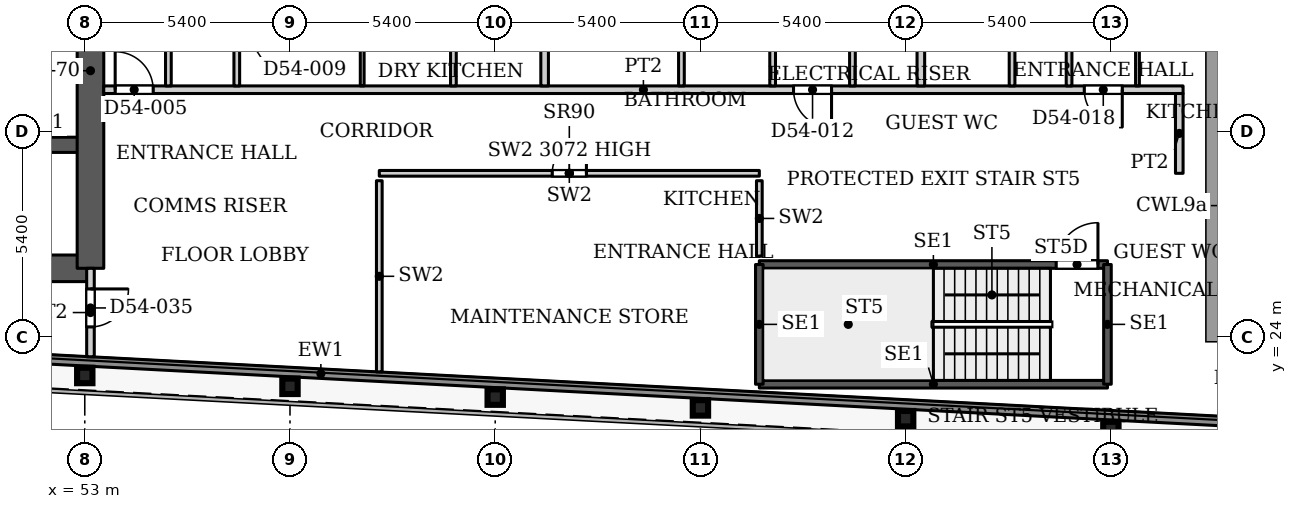
"""IFC4 building model, lengths in metres.
Left out: names, types, materials, properties, quantities, classifications, styles, units other than length and angle.
Written with IfcOpenShell. Run it as: python <this file> out.ifc"""

import sys

from ifc_helpers import new_model, si_unit, direction, frame, frame_2d, origin, origin_2d, place, context, subcontext, project, spatial, rectangle, i_section, extrude, source, transform, mapped, element, fill, save


model = new_model("IFC4")
c1 = context("Model", 3, precision=1e-05, world=origin(), true_north=direction((0.0, 1.0)))
c2 = subcontext(c1, "Body", "Model", "MODEL_VIEW")
j1 = project(units=[si_unit("LENGTHUNIT", "METRE"), si_unit("PLANEANGLEUNIT", "RADIAN")], contexts=[c1])
p1 = place(None, origin())
s1 = spatial("IfcSite", under=j1, at=p1, CompositionType="ELEMENT")
p2 = place(p1, origin())
s2 = spatial("IfcBuilding", under=s1, at=p2, CompositionType="ELEMENT")
p3 = place(p2, frame((0.0, 0.0, 231.8)))
s3 = spatial("IfcBuildingStorey", under=s2, at=p3, CompositionType="ELEMENT", Elevation=231.8)
for number, where, z_axis, x_axis in (
    (1, (80.0, 21.558, 0.0), (0.0, 0.0, 1.0), (1.0, 0.0, 0.0)),
    (2, (74.6, 21.843, 0.0), (0.0, 0.0, 1.0), (1.0, 0.0, 0.0)),
    (3, (69.2, 22.127, 0.0), (0.0, 0.0, 1.0), (1.0, 0.0, 0.0)),
    (4, (63.8, 22.411, 0.0), (0.0, 0.0, 1.0), (1.0, 0.0, 0.0)),
    (5, (58.4, 22.695, 0.0), (0.0, 0.0, 1.0), (1.0, 0.0, 0.0)),
    (6, (53.0, 22.98, 0.0), (0.0, 0.0, 1.0), (1.0, 0.0, 0.0)),
):
    element("IfcColumn", number, at=place(p3, frame(where, z_axis=z_axis, x_axis=x_axis)), inside=s3, PredefinedType="COLUMN", context=c2, shape_type="SweptSolid", body=[
        extrude(i_section(OverallWidth=0.404, OverallDepth=0.407, WebThickness=0.027, FlangeThickness=0.044, FilletRadius=0.012, at=origin_2d()), origin(), (0.0, 0.0, 1.0), 3.9),
    ])
p4 = place(p3, frame((34.75, 25.8, 0.0), z_axis=(0.0, 0.0, 1.0), x_axis=(1.0, 0.0, 0.0)))
e7 = element("IfcWall", 7, at=p4, inside=s3, PredefinedType="SHEAR", context=c2, shape_type="SweptSolid", body=[
    extrude(rectangle(XDim=18.4, YDim=0.7, at=frame_2d((9.2, 0.0))), origin(), (0.0, 0.0, 1.0), 3.9),
])
p5 = place(p3, frame((34.75, 29.05, 0.0), z_axis=(0.0, 0.0, 1.0), x_axis=(1.0, 0.0, 0.0)))
e8 = element("IfcWall", 8, at=p5, inside=s3, PredefinedType="SHEAR", context=c2, shape_type="SweptSolid", body=[
    extrude(rectangle(XDim=18.4, YDim=0.4, at=frame_2d((9.2, 0.0))), origin(), (0.0, 0.0, 1.0), 3.9),
])
p6 = place(p5, frame((0.875, 0.0, 0.0)))
e9 = element("IfcOpeningElement", 9, at=p6, cuts=e8, PredefinedType="OPENING", context=c2, shape_type="SweptSolid", body=[
    extrude(rectangle(XDim=1.1, YDim=2.2, at=frame_2d((0.55, 1.1))), frame((0.0, 0.21, 0.0), z_axis=(0.0, -1.0, 0.0), x_axis=(1.0, 0.0, 0.0)), (0.0, 0.0, 1.0), 0.42),
])
p7 = place(p5, frame((3.725, 0.0, 0.0)))
e10 = element("IfcOpeningElement", 10, at=p7, cuts=e8, PredefinedType="OPENING", context=c2, shape_type="SweptSolid", body=[
    extrude(rectangle(XDim=1.1, YDim=2.2, at=frame_2d((0.55, 1.1))), frame((0.0, 0.21, 0.0), z_axis=(0.0, -1.0, 0.0), x_axis=(1.0, 0.0, 0.0)), (0.0, 0.0, 1.0), 0.42),
])
p8 = place(p5, frame((6.575, 0.0, 0.0)))
e11 = element("IfcOpeningElement", 11, at=p8, cuts=e8, PredefinedType="OPENING", context=c2, shape_type="SweptSolid", body=[
    extrude(rectangle(XDim=1.1, YDim=2.2, at=frame_2d((0.55, 1.1))), frame((0.0, 0.21, 0.0), z_axis=(0.0, -1.0, 0.0), x_axis=(1.0, 0.0, 0.0)), (0.0, 0.0, 1.0), 0.42),
])
p9 = place(p5, frame((9.425, 0.0, 0.0)))
e12 = element("IfcOpeningElement", 12, at=p9, cuts=e8, PredefinedType="OPENING", context=c2, shape_type="SweptSolid", body=[
    extrude(rectangle(XDim=1.1, YDim=2.2, at=frame_2d((0.55, 1.1))), frame((0.0, 0.21, 0.0), z_axis=(0.0, -1.0, 0.0), x_axis=(1.0, 0.0, 0.0)), (0.0, 0.0, 1.0), 0.42),
])
p10 = place(p5, frame((12.275, 0.0, 0.0)))
e13 = element("IfcOpeningElement", 13, at=p10, cuts=e8, PredefinedType="OPENING", context=c2, shape_type="SweptSolid", body=[
    extrude(rectangle(XDim=1.1, YDim=2.2, at=frame_2d((0.55, 1.1))), frame((0.0, 0.21, 0.0), z_axis=(0.0, -1.0, 0.0), x_axis=(1.0, 0.0, 0.0)), (0.0, 0.0, 1.0), 0.42),
])
p11 = place(p5, frame((15.125, 0.0, 0.0)))
e14 = element("IfcOpeningElement", 14, at=p11, cuts=e8, PredefinedType="OPENING", context=c2, shape_type="SweptSolid", body=[
    extrude(rectangle(XDim=1.1, YDim=2.2, at=frame_2d((0.55, 1.1))), frame((0.0, 0.21, 0.0), z_axis=(0.0, -1.0, 0.0), x_axis=(1.0, 0.0, 0.0)), (0.0, 0.0, 1.0), 0.42),
])
p12 = place(p3, frame((53.15, 25.8, 0.0), z_axis=(0.0, 0.0, 1.0), x_axis=(0.0, 1.0, 0.0)))
e15 = element("IfcWall", 15, at=p12, inside=s3, PredefinedType="SHEAR", context=c2, shape_type="SweptSolid", body=[
    extrude(rectangle(XDim=10.4, YDim=0.7, at=frame_2d((5.2, 0.0))), origin(), (0.0, 0.0, 1.0), 3.9),
])
p13 = place(p3, frame((84.386, 21.703, 0.0), z_axis=(0.0, 0.0, 1.0), x_axis=(-0.998617508267, 0.05256493302, 0.0)))
e16 = element("IfcWall", 16, at=p13, inside=s3, PredefinedType="SOLIDWALL", context=c2, shape_type="SweptSolid", body=[
    extrude(rectangle(XDim=50.417, YDim=0.25, at=frame_2d((25.208, 0.0))), origin(), (0.0, 0.0, 1.0), 3.75),
])
p14 = place(p3, frame((70.75, 22.75, 0.0), z_axis=(0.0, 0.0, 1.0), x_axis=(1.0, 0.0, 0.0)))
e17 = element("IfcWall", 17, at=p14, inside=s3, PredefinedType="SHEAR", context=c2, shape_type="SweptSolid", body=[
    extrude(rectangle(XDim=9.16, YDim=0.2, at=frame_2d((4.58, 0.0))), origin(), (0.0, 0.0, 1.0), 3.9),
])
p15 = place(p3, frame((70.75, 25.9, 0.0), z_axis=(0.0, 0.0, 1.0), x_axis=(1.0, 0.0, 0.0)))
e18 = element("IfcWall", 18, at=p15, inside=s3, PredefinedType="SHEAR", context=c2, shape_type="SweptSolid", body=[
    extrude(rectangle(XDim=9.16, YDim=0.2, at=frame_2d((4.58, 0.0))), origin(), (0.0, 0.0, 1.0), 3.9),
])
p16 = place(p15, frame((7.81, 0.0, 0.0)))
e19 = element("IfcOpeningElement", 19, at=p16, cuts=e18, PredefinedType="OPENING", context=c2, shape_type="SweptSolid", body=[
    extrude(rectangle(XDim=1.1, YDim=2.2, at=frame_2d((0.55, 1.1))), frame((0.0, 0.11, 0.0), z_axis=(0.0, -1.0, 0.0), x_axis=(1.0, 0.0, 0.0)), (0.0, 0.0, 1.0), 0.22),
])
for number, where, z_axis, x_axis in (
    (20, (70.75, 22.75, 0.0), (0.0, 0.0, 1.0), (0.0, 1.0, 0.0)),
    (21, (79.91, 22.75, 0.0), (0.0, 0.0, 1.0), (0.0, 1.0, 0.0)),
):
    element("IfcWall", number, at=place(p3, frame(where, z_axis=z_axis, x_axis=x_axis)), inside=s3, PredefinedType="SHEAR", context=c2, shape_type="SweptSolid", body=[
        extrude(rectangle(XDim=3.15, YDim=0.2, at=frame_2d((1.575, 0.0))), origin(), (0.0, 0.0, 1.0), 3.9),
    ])
p17 = place(p3, frame((60.75, 28.3, 0.0), z_axis=(0.0, 0.0, 1.0), x_axis=(1.0, 0.0, 0.0)))
e22 = element("IfcWall", 22, at=p17, inside=s3, PredefinedType="PARTITIONING", context=c2, shape_type="SweptSolid", body=[
    extrude(rectangle(XDim=10.0, YDim=0.15, at=frame_2d((5.0, 0.0))), origin(), (0.0, 0.0, 1.0), 3.072),
])
p18 = place(p17, frame((4.55, 0.0, 0.0)))
e23 = element("IfcOpeningElement", 23, at=p18, cuts=e22, PredefinedType="OPENING", context=c2, shape_type="SweptSolid", body=[
    extrude(rectangle(XDim=0.9, YDim=2.2, at=frame_2d((0.45, 1.1))), frame((0.0, 0.085, 0.0), z_axis=(0.0, -1.0, 0.0), x_axis=(1.0, 0.0, 0.0)), (0.0, 0.0, 1.0), 0.17),
])
p19 = place(p3, frame((60.75, 23.075, 0.0), z_axis=(0.0, 0.0, 1.0), x_axis=(0.0, 1.0, 0.0)))
e24 = element("IfcWall", 24, at=p19, inside=s3, PredefinedType="PARTITIONING", context=c2, shape_type="SweptSolid", body=[
    extrude(rectangle(XDim=5.03, YDim=0.15, at=frame_2d((2.515, 0.0))), origin(), (0.0, 0.0, 1.0), 3.9),
])
p20 = place(p3, frame((70.75, 26.12, 0.0), z_axis=(0.0, 0.0, 1.0), x_axis=(0.0, 1.0, 0.0)))
e25 = element("IfcWall", 25, at=p20, inside=s3, PredefinedType="PARTITIONING", context=c2, shape_type="SweptSolid", body=[
    extrude(rectangle(XDim=1.985, YDim=0.15, at=frame_2d((0.992, 0.0))), origin(), (0.0, 0.0, 1.0), 3.9),
])
p21 = place(p3, frame((53.15, 23.472, 0.0), z_axis=(0.0, 0.0, 1.0), x_axis=(0.0, 1.0, 0.0)))
e26 = element("IfcWall", 26, at=p21, inside=s3, PredefinedType="PARTITIONING", context=c2, shape_type="SweptSolid", body=[
    extrude(rectangle(XDim=2.328, YDim=0.2, at=frame_2d((1.164, 0.0))), origin(), (0.0, 0.0, 1.0), 3.6),
])
p22 = place(p21, frame((0.785, 0.0, 0.0)))
e27 = element("IfcOpeningElement", 27, at=p22, cuts=e26, PredefinedType="OPENING", context=c2, shape_type="SweptSolid", body=[
    extrude(rectangle(XDim=1.0, YDim=2.1, at=frame_2d((0.5, 1.05))), frame((0.0, 0.11, 0.0), z_axis=(0.0, -1.0, 0.0), x_axis=(1.0, 0.0, 0.0)), (0.0, 0.0, 1.0), 0.22),
])
p23 = place(p3, frame((53.499, 30.5, 0.0), z_axis=(0.0, 0.0, 1.0), x_axis=(1.0, 0.0, 0.0)))
e28 = element("IfcWall", 28, at=p23, inside=s3, PredefinedType="PARTITIONING", context=c2, shape_type="SweptSolid", body=[
    extrude(rectangle(XDim=28.401, YDim=0.2, at=frame_2d((14.2, 0.0))), origin(), (0.0, 0.0, 1.0), 3.6),
])
p24 = place(p23, frame((0.301, 0.0, 0.0)))
e29 = element("IfcOpeningElement", 29, at=p24, cuts=e28, PredefinedType="OPENING", context=c2, shape_type="SweptSolid", body=[
    extrude(rectangle(XDim=1.0, YDim=2.1, at=frame_2d((0.5, 1.05))), frame((0.0, 0.11, 0.0), z_axis=(0.0, -1.0, 0.0), x_axis=(1.0, 0.0, 0.0)), (0.0, 0.0, 1.0), 0.22),
])
p25 = place(p23, frame((18.151, 0.0, 0.0)))
e30 = element("IfcOpeningElement", 30, at=p25, cuts=e28, PredefinedType="OPENING", context=c2, shape_type="SweptSolid", body=[
    extrude(rectangle(XDim=1.0, YDim=2.1, at=frame_2d((0.5, 1.05))), frame((0.0, 0.11, 0.0), z_axis=(0.0, -1.0, 0.0), x_axis=(1.0, 0.0, 0.0)), (0.0, 0.0, 1.0), 0.22),
])
p26 = place(p23, frame((25.801, 0.0, 0.0)))
e31 = element("IfcOpeningElement", 31, at=p26, cuts=e28, PredefinedType="OPENING", context=c2, shape_type="SweptSolid", body=[
    extrude(rectangle(XDim=1.0, YDim=2.1, at=frame_2d((0.5, 1.05))), frame((0.0, 0.11, 0.0), z_axis=(0.0, -1.0, 0.0), x_axis=(1.0, 0.0, 0.0)), (0.0, 0.0, 1.0), 0.22),
])
for number, where, z_axis, x_axis in (
    (32, (55.2, 30.6, 0.0), (0.0, 0.0, 1.0), (0.0, 1.0, 0.0)),
    (33, (57.0, 30.6, 0.0), (0.0, 0.0, 1.0), (0.0, 1.0, 0.0)),
):
    element("IfcWall", number, at=place(p3, frame(where, z_axis=z_axis, x_axis=x_axis)), inside=s3, PredefinedType="PARTITIONING", context=c2, shape_type="SweptSolid", body=[
        extrude(rectangle(XDim=3.025, YDim=0.15, at=frame_2d((1.512, 0.0))), origin(), (0.0, 0.0, 1.0), 3.6),
    ])
p27 = place(p3, frame((60.3, 30.6, 0.0), z_axis=(0.0, 0.0, 1.0), x_axis=(0.0, 1.0, 0.0)))
e34 = element("IfcWall", 34, at=p27, inside=s3, PredefinedType="PARTITIONING", context=c2, shape_type="SweptSolid", body=[
    extrude(rectangle(XDim=3.025, YDim=0.1, at=frame_2d((1.512, 0.0))), origin(), (0.0, 0.0, 1.0), 3.6),
])
p28 = place(p3, frame((62.7, 30.6, 0.0), z_axis=(0.0, 0.0, 1.0), x_axis=(0.0, 1.0, 0.0)))
e35 = element("IfcWall", 35, at=p28, inside=s3, PredefinedType="PARTITIONING", context=c2, shape_type="SweptSolid", body=[
    extrude(rectangle(XDim=3.025, YDim=0.15, at=frame_2d((1.512, 0.0))), origin(), (0.0, 0.0, 1.0), 3.6),
])
p29 = place(p3, frame((65.1, 30.6, 0.0), z_axis=(0.0, 0.0, 1.0), x_axis=(0.0, 1.0, 0.0)))
e36 = element("IfcWall", 36, at=p29, inside=s3, PredefinedType="PARTITIONING", context=c2, shape_type="SweptSolid", body=[
    extrude(rectangle(XDim=13.3, YDim=0.2, at=frame_2d((6.65, 0.0))), origin(), (0.0, 0.0, 1.0), 3.6),
])
for number, where, z_axis, x_axis in (
    (37, (68.7, 30.6, 0.0), (0.0, 0.0, 1.0), (0.0, 1.0, 0.0)),
    (38, (71.1, 30.6, 0.0), (0.0, 0.0, 1.0), (0.0, 1.0, 0.0)),
):
    element("IfcWall", number, at=place(p3, frame(where, z_axis=z_axis, x_axis=x_axis)), inside=s3, PredefinedType="PARTITIONING", context=c2, shape_type="SweptSolid", body=[
        extrude(rectangle(XDim=3.025, YDim=0.15, at=frame_2d((1.512, 0.0))), origin(), (0.0, 0.0, 1.0), 3.6),
    ])
p30 = place(p3, frame((73.2, 30.6, 0.0), z_axis=(0.0, 0.0, 1.0), x_axis=(0.0, 1.0, 0.0)))
e39 = element("IfcWall", 39, at=p30, inside=s3, PredefinedType="PARTITIONING", context=c2, shape_type="SweptSolid", body=[
    extrude(rectangle(XDim=3.175, YDim=0.15, at=frame_2d((1.587, 0.0))), origin(), (0.0, 0.0, 1.0), 3.6),
])
p31 = place(p3, frame((75.0, 30.6, 0.0), z_axis=(0.0, 0.0, 1.0), x_axis=(0.0, 1.0, 0.0)))
e40 = element("IfcWall", 40, at=p31, inside=s3, PredefinedType="PARTITIONING", context=c2, shape_type="SweptSolid", body=[
    extrude(rectangle(XDim=13.3, YDim=0.2, at=frame_2d((6.65, 0.0))), origin(), (0.0, 0.0, 1.0), 3.6),
])
for number, where, z_axis, x_axis in (
    (41, (77.4, 30.6, 0.0), (0.0, 0.0, 1.0), (0.0, 1.0, 0.0)),
    (42, (78.9, 30.6, 0.0), (0.0, 0.0, 1.0), (0.0, 1.0, 0.0)),
):
    element("IfcWall", number, at=place(p3, frame(where, z_axis=z_axis, x_axis=x_axis)), inside=s3, PredefinedType="PARTITIONING", context=c2, shape_type="SweptSolid", body=[
        extrude(rectangle(XDim=3.025, YDim=0.15, at=frame_2d((1.512, 0.0))), origin(), (0.0, 0.0, 1.0), 3.6),
    ])
p32 = place(p3, frame((80.7, 30.6, 0.0), z_axis=(0.0, 0.0, 1.0), x_axis=(0.0, 1.0, 0.0)))
e43 = element("IfcWall", 43, at=p32, inside=s3, PredefinedType="PARTITIONING", context=c2, shape_type="SweptSolid", body=[
    extrude(rectangle(XDim=3.15, YDim=0.1, at=frame_2d((1.575, 0.0))), origin(), (0.0, 0.0, 1.0), 3.6),
])
p33 = place(p3, frame((81.8, 28.3, 0.0), z_axis=(0.0, 0.0, 1.0), x_axis=(0.0, 1.0, 0.0)))
e44 = element("IfcWall", 44, at=p33, inside=s3, PredefinedType="PARTITIONING", context=c2, shape_type="SweptSolid", body=[
    extrude(rectangle(XDim=2.1, YDim=0.2, at=frame_2d((1.05, 0.0))), origin(), (0.0, 0.0, 1.0), 3.6),
])
m1 = source(origin(), c2, "Body", "SweptSolid", [
    extrude(rectangle(XDim=0.9, YDim=2.2, at=frame_2d((0.45, 1.1))), frame((0.0, 0.025, 0.0), z_axis=(0.0, -1.0, 0.0), x_axis=(1.0, 0.0, 0.0)), (0.0, 0.0, 1.0), 0.05),
])
p34 = place(p18, origin())
e45 = element("IfcDoor", 45, at=p34, inside=s3, OperationType="SINGLE_SWING_LEFT", PredefinedType="DOOR", context=c2, shape_type="MappedRepresentation", body=[
    mapped(m1, transform((0.0, 0.0, 0.0), x_axis=(1.0, 0.0, 0.0), y_axis=(0.0, 1.0, 0.0), z_axis=(0.0, 0.0, 1.0), scale=1.0)),
])
fill(e23, e45)
m2 = source(origin(), c2, "Body", "SweptSolid", [
    extrude(rectangle(XDim=1.1, YDim=2.2, at=frame_2d((0.55, 1.1))), frame((0.0, 0.025, 0.0), z_axis=(0.0, -1.0, 0.0), x_axis=(1.0, 0.0, 0.0)), (0.0, 0.0, 1.0), 0.05),
])
p35 = place(p16, origin())
e46 = element("IfcDoor", 46, at=p35, inside=s3, OperationType="SINGLE_SWING_LEFT", PredefinedType="DOOR", context=c2, shape_type="MappedRepresentation", body=[
    mapped(m2, transform((0.0, 0.0, 0.0), x_axis=(1.0, 0.0, 0.0), y_axis=(0.0, 1.0, 0.0), z_axis=(0.0, 0.0, 1.0), scale=1.0)),
])
fill(e19, e46)
m3 = source(origin(), c2, "Body", "SweptSolid", [
    extrude(rectangle(XDim=1.0, YDim=2.1, at=frame_2d((0.5, 1.05))), frame((0.0, 0.025, 0.0), z_axis=(0.0, -1.0, 0.0), x_axis=(1.0, 0.0, 0.0)), (0.0, 0.0, 1.0), 0.05),
])
p36 = place(p24, origin())
e47 = element("IfcDoor", 47, at=p36, inside=s3, OperationType="SINGLE_SWING_LEFT", PredefinedType="DOOR", context=c2, shape_type="MappedRepresentation", body=[
    mapped(m3, transform((0.0, 0.0, 0.0), x_axis=(1.0, 0.0, 0.0), y_axis=(0.0, 1.0, 0.0), z_axis=(0.0, 0.0, 1.0), scale=1.0)),
])
fill(e29, e47)
p37 = place(p25, origin())
e48 = element("IfcDoor", 48, at=p37, inside=s3, OperationType="SINGLE_SWING_RIGHT", PredefinedType="DOOR", context=c2, shape_type="MappedRepresentation", body=[
    mapped(m3, transform((0.0, 0.0, 0.0), x_axis=(1.0, 0.0, 0.0), y_axis=(0.0, 1.0, 0.0), z_axis=(0.0, 0.0, 1.0), scale=1.0)),
])
fill(e30, e48)
p38 = place(p26, origin())
e49 = element("IfcDoor", 49, at=p38, inside=s3, OperationType="SINGLE_SWING_RIGHT", PredefinedType="DOOR", context=c2, shape_type="MappedRepresentation", body=[
    mapped(m3, transform((0.0, 0.0, 0.0), x_axis=(1.0, 0.0, 0.0), y_axis=(0.0, 1.0, 0.0), z_axis=(0.0, 0.0, 1.0), scale=1.0)),
])
fill(e31, e49)
m4 = source(origin(), c2, "Body", "SweptSolid", [
    extrude(rectangle(XDim=1.0, YDim=2.1, at=frame_2d((0.5, 1.05))), frame((0.0, 0.025, 0.0), z_axis=(0.0, -1.0, 0.0), x_axis=(1.0, 0.0, 0.0)), (0.0, 0.0, 1.0), 0.05),
])
p39 = place(p22, origin())
e50 = element("IfcDoor", 50, at=p39, inside=s3, OperationType="SINGLE_SWING_RIGHT", PredefinedType="DOOR", context=c2, shape_type="MappedRepresentation", body=[
    mapped(m4, transform((0.0, 0.0, 0.0), x_axis=(1.0, 0.0, 0.0), y_axis=(0.0, 1.0, 0.0), z_axis=(0.0, 0.0, 1.0), scale=1.0)),
])
fill(e27, e50)
save(model, sys.argv[1])
